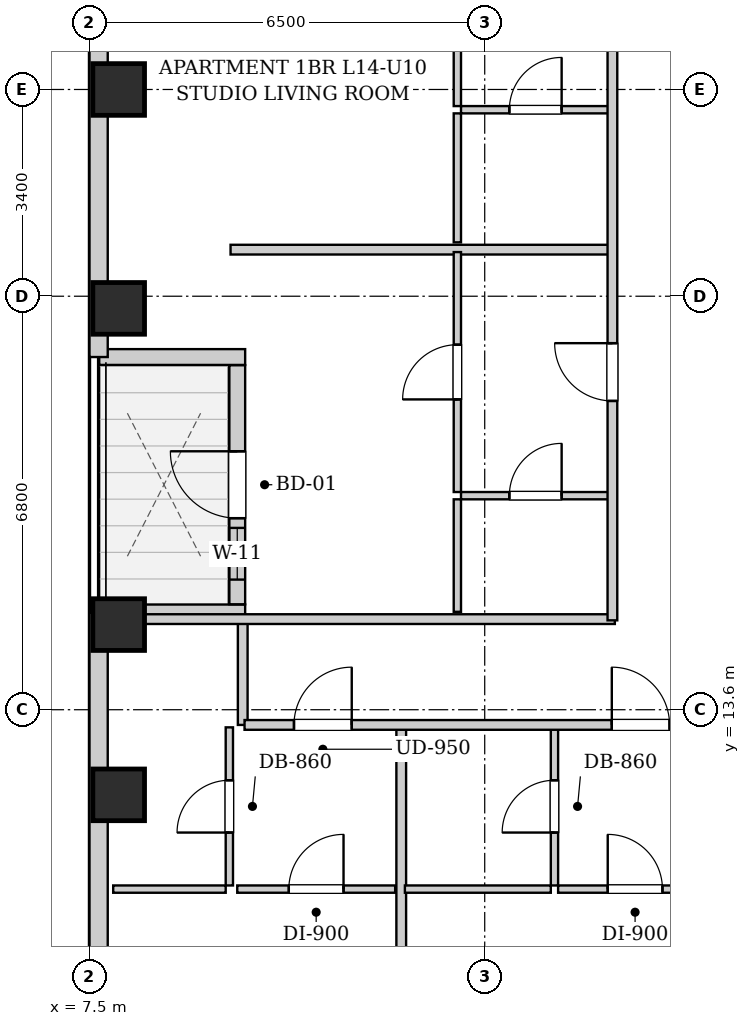
"""IFC4 building model, lengths in metres.
Left out: names, types, materials, properties, quantities, classifications, styles, units other than length and angle.
Written with IfcOpenShell. Run it as: python <this file> out.ifc"""

import sys

from ifc_helpers import new_model, si_unit, direction, frame, frame_2d, origin, origin_2d, place, context, subcontext, project, spatial, rectangle, extrude, element, fill, save


model = new_model("IFC4")
c1 = context("Model", 3, precision=1e-05, world=origin(), true_north=direction((0.0, 1.0)))
c2 = subcontext(c1, "Body", "Model", "MODEL_VIEW")
j1 = project(units=[si_unit("LENGTHUNIT", "METRE"), si_unit("PLANEANGLEUNIT", "RADIAN")], contexts=[c1])
p1 = place(None, origin())
s1 = spatial("IfcSite", under=j1, at=p1, CompositionType="ELEMENT")
p2 = place(p1, origin())
s2 = spatial("IfcBuilding", under=s1, at=p2, CompositionType="ELEMENT")
p3 = place(p2, frame((0.0, 0.0, 54.6)))
s3 = spatial("IfcBuildingStorey", under=s2, at=p3, CompositionType="ELEMENT", Elevation=54.6)
for number, where, z_axis, x_axis in (
    (1, (7.98, 12.2, 0.0), (0.0, 0.0, 1.0), (1.0, 0.0, 0.0)),
    (2, (7.98, 15.0, 0.0), (0.0, 0.0, 1.0), (1.0, 0.0, 0.0)),
    (3, (7.98, 20.2, 0.0), (0.0, 0.0, 1.0), (1.0, 0.0, 0.0)),
    (4, (7.98, 23.8, 0.0), (0.0, 0.0, 1.0), (1.0, 0.0, 0.0)),
):
    element("IfcColumn", number, at=place(p3, frame(where, z_axis=z_axis, x_axis=x_axis)), inside=s3, PredefinedType="COLUMN", context=c2, shape_type="SweptSolid", body=[
        extrude(rectangle(XDim=0.85, YDim=0.85, at=origin_2d()), origin(), (0.0, 0.0, 1.0), 3.2),
    ])
p4 = place(p3, frame((7.65, 2.5, 0.0), z_axis=(0.0, 0.0, 1.0), x_axis=(0.0, 1.0, 0.0)))
e5 = element("IfcWall", 5, at=p4, inside=s3, PredefinedType="SOLIDWALL", context=c2, shape_type="SweptSolid", body=[
    extrude(rectangle(XDim=12.7, YDim=0.3, at=frame_2d((6.35, 0.0))), origin(), (0.0, 0.0, 1.0), 1.975),
])
p5 = place(p4, frame((3.257, 0.0, 0.55)))
e6 = element("IfcOpeningElement", 6, at=p5, cuts=e5, PredefinedType="OPENING", context=c2, shape_type="SweptSolid", body=[
    extrude(rectangle(XDim=1.8, YDim=1.2, at=frame_2d((0.9, 0.6))), frame((0.0, 0.16, 0.0), z_axis=(0.0, -1.0, 0.0), x_axis=(1.0, 0.0, 0.0)), (0.0, 0.0, 1.0), 0.32),
])
p6 = place(p4, frame((1.185, 0.0, 0.55)))
e7 = element("IfcOpeningElement", 7, at=p6, cuts=e5, PredefinedType="OPENING", context=c2, shape_type="SweptSolid", body=[
    extrude(rectangle(XDim=1.35, YDim=1.2, at=frame_2d((0.675, 0.6))), frame((0.0, 0.16, 0.0), z_axis=(0.0, -1.0, 0.0), x_axis=(1.0, 0.0, 0.0)), (0.0, 0.0, 1.0), 0.32),
])
p7 = place(p3, frame((7.66, 15.2, 0.0), z_axis=(0.0, 0.0, 1.0), x_axis=(1.0, 0.0, 0.0)))
e8 = element("IfcWall", 8, at=p7, inside=s3, PredefinedType="SOLIDWALL", context=c2, shape_type="SweptSolid", body=[
    extrude(rectangle(XDim=2.4, YDim=0.26, at=frame_2d((1.2, 0.0))), origin(), (0.0, 0.0, 1.0), 2.94),
])
p8 = place(p3, frame((9.93, 15.334, 0.0), z_axis=(0.0, 0.0, 1.0), x_axis=(0.0, 1.0, 0.0)))
e9 = element("IfcWall", 9, at=p8, inside=s3, PredefinedType="SOLIDWALL", context=c2, shape_type="SweptSolid", body=[
    extrude(rectangle(XDim=3.932, YDim=0.26, at=frame_2d((1.966, 0.0))), origin(), (0.0, 0.0, 1.0), 2.94),
])
p9 = place(p8, frame((1.416, 0.0, 0.0)))
e10 = element("IfcOpeningElement", 10, at=p9, cuts=e9, PredefinedType="OPENING", context=c2, shape_type="SweptSolid", body=[
    extrude(rectangle(XDim=1.1, YDim=2.0, at=frame_2d((0.55, 1.0))), frame((0.0, 0.14, 0.0), z_axis=(0.0, -1.0, 0.0), x_axis=(1.0, 0.0, 0.0)), (0.0, 0.0, 1.0), 0.28),
])
p10 = place(p8, frame((0.406, 0.0, 0.55)))
e11 = element("IfcOpeningElement", 11, at=p10, cuts=e9, PredefinedType="OPENING", context=c2, shape_type="SweptSolid", body=[
    extrude(rectangle(XDim=0.85, YDim=1.2, at=frame_2d((0.425, 0.6))), frame((0.0, 0.14, 0.0), z_axis=(0.0, -1.0, 0.0), x_axis=(1.0, 0.0, 0.0)), (0.0, 0.0, 1.0), 0.28),
])
p11 = place(p3, frame((10.06, 19.4, 0.0), z_axis=(0.0, 0.0, 1.0), x_axis=(-1.0, 0.0, 0.0)))
e12 = element("IfcWall", 12, at=p11, inside=s3, PredefinedType="SOLIDWALL", context=c2, shape_type="SweptSolid", body=[
    extrude(rectangle(XDim=2.4, YDim=0.26, at=frame_2d((1.2, 0.0))), origin(), (0.0, 0.0, 1.0), 2.94),
])
p12 = place(p3, frame((7.65, 19.4, 0.0), z_axis=(0.0, 0.0, 1.0), x_axis=(0.0, 1.0, 0.0)))
e13 = element("IfcWall", 13, at=p12, inside=s3, PredefinedType="SOLIDWALL", context=c2, shape_type="SweptSolid", body=[
    extrude(rectangle(XDim=25.7, YDim=0.3, at=frame_2d((12.85, 0.0))), origin(), (0.0, 0.0, 1.0), 1.975),
])
p13 = place(p12, frame((20.185, 0.0, 0.55)))
e14 = element("IfcOpeningElement", 14, at=p13, cuts=e13, PredefinedType="OPENING", context=c2, shape_type="SweptSolid", body=[
    extrude(rectangle(XDim=1.8, YDim=1.2, at=frame_2d((0.9, 0.6))), frame((0.0, 0.16, 0.0), z_axis=(0.0, -1.0, 0.0), x_axis=(1.0, 0.0, 0.0)), (0.0, 0.0, 1.0), 0.32),
])
p14 = place(p12, frame((14.585, 0.0, 0.55)))
e15 = element("IfcOpeningElement", 15, at=p14, cuts=e13, PredefinedType="OPENING", context=c2, shape_type="SweptSolid", body=[
    extrude(rectangle(XDim=1.35, YDim=1.2, at=frame_2d((0.675, 0.6))), frame((0.0, 0.16, 0.0), z_axis=(0.0, -1.0, 0.0), x_axis=(1.0, 0.0, 0.0)), (0.0, 0.0, 1.0), 0.32),
])
p15 = place(p12, frame((5.1, 0.0, 0.55)))
e16 = element("IfcOpeningElement", 16, at=p15, cuts=e13, PredefinedType="OPENING", context=c2, shape_type="SweptSolid", body=[
    extrude(rectangle(XDim=1.8, YDim=1.2, at=frame_2d((0.9, 0.6))), frame((0.0, 0.16, 0.0), z_axis=(0.0, -1.0, 0.0), x_axis=(1.0, 0.0, 0.0)), (0.0, 0.0, 1.0), 0.32),
])
p16 = place(p12, frame((7.16, 0.0, 0.55)))
e17 = element("IfcOpeningElement", 17, at=p16, cuts=e13, PredefinedType="OPENING", context=c2, shape_type="SweptSolid", body=[
    extrude(rectangle(XDim=1.35, YDim=1.2, at=frame_2d((0.675, 0.6))), frame((0.0, 0.16, 0.0), z_axis=(0.0, -1.0, 0.0), x_axis=(1.0, 0.0, 0.0)), (0.0, 0.0, 1.0), 0.32),
])
p17 = place(p3, frame((10.02, 13.35, 0.0), z_axis=(0.0, 0.0, 1.0), x_axis=(0.0, 1.0, 0.0)))
e18 = element("IfcWall", 18, at=p17, inside=s3, PredefinedType="PARTITIONING", context=c2, shape_type="SweptSolid", body=[
    extrude(rectangle(XDim=1.74, YDim=0.16, at=frame_2d((0.87, 0.0))), origin(), (0.0, 0.0, 1.0), 2.94),
])
p18 = place(p3, frame((7.78, 15.09, 0.0), z_axis=(0.0, 0.0, 1.0), x_axis=(1.0, 0.0, 0.0)))
e19 = element("IfcWall", 19, at=p18, inside=s3, PredefinedType="PARTITIONING", context=c2, shape_type="SweptSolid", body=[
    extrude(rectangle(XDim=8.36, YDim=0.16, at=frame_2d((4.18, 0.0))), origin(), (0.0, 0.0, 1.0), 2.232),
])
p19 = place(p3, frame((9.8, 10.71, 0.0), z_axis=(0.0, 0.0, 1.0), x_axis=(0.0, 1.0, 0.0)))
e20 = element("IfcWall", 20, at=p19, inside=s3, PredefinedType="PARTITIONING", context=c2, shape_type="SweptSolid", body=[
    extrude(rectangle(XDim=2.6, YDim=0.12, at=frame_2d((1.3, 0.0))), origin(), (0.0, 0.0, 1.0), 2.94),
])
p20 = place(p19, frame((0.87, 0.0, 0.0)))
e21 = element("IfcOpeningElement", 21, at=p20, cuts=e20, PredefinedType="OPENING", context=c2, shape_type="SweptSolid", body=[
    extrude(rectangle(XDim=0.86, YDim=2.05, at=frame_2d((0.43, 1.025))), frame((0.0, 0.07, 0.0), z_axis=(0.0, -1.0, 0.0), x_axis=(1.0, 0.0, 0.0)), (0.0, 0.0, 1.0), 0.14),
])
p21 = place(p3, frame((7.89, 10.65, 0.0), z_axis=(0.0, 0.0, 1.0), x_axis=(1.0, 0.0, 0.0)))
e22 = element("IfcWall", 22, at=p21, inside=s3, PredefinedType="PARTITIONING", context=c2, shape_type="SweptSolid", body=[
    extrude(rectangle(XDim=1.85, YDim=0.12, at=frame_2d((0.925, 0.0))), origin(), (0.0, 0.0, 1.0), 2.94),
])
p22 = place(p3, frame((9.93, 10.65, 0.0), z_axis=(0.0, 0.0, 1.0), x_axis=(1.0, 0.0, 0.0)))
e23 = element("IfcWall", 23, at=p22, inside=s3, PredefinedType="PARTITIONING", context=c2, shape_type="SweptSolid", body=[
    extrude(rectangle(XDim=2.597, YDim=0.12, at=frame_2d((1.299, 0.0))), origin(), (0.0, 0.0, 1.0), 2.94),
])
p23 = place(p22, frame((0.848, 0.0, 0.0)))
e24 = element("IfcOpeningElement", 24, at=p23, cuts=e23, PredefinedType="OPENING", context=c2, shape_type="SweptSolid", body=[
    extrude(rectangle(XDim=0.9, YDim=2.05, at=frame_2d((0.45, 1.025))), frame((0.0, 0.07, 0.0), z_axis=(0.0, -1.0, 0.0), x_axis=(1.0, 0.0, 0.0)), (0.0, 0.0, 1.0), 0.14),
])
p24 = place(p3, frame((12.627, 2.26, 0.0), z_axis=(0.0, 0.0, 1.0), x_axis=(0.0, 1.0, 0.0)))
e25 = element("IfcWall", 25, at=p24, inside=s3, PredefinedType="PARTITIONING", context=c2, shape_type="SweptSolid", body=[
    extrude(rectangle(XDim=11.05, YDim=0.16, at=frame_2d((5.525, 0.0))), origin(), (0.0, 0.0, 1.0), 2.94),
])
p25 = place(p3, frame((15.147, 10.71, 0.0), z_axis=(0.0, 0.0, 1.0), x_axis=(0.0, 1.0, 0.0)))
e26 = element("IfcWall", 26, at=p25, inside=s3, PredefinedType="PARTITIONING", context=c2, shape_type="SweptSolid", body=[
    extrude(rectangle(XDim=2.6, YDim=0.12, at=frame_2d((1.3, 0.0))), origin(), (0.0, 0.0, 1.0), 2.94),
])
p26 = place(p25, frame((0.87, 0.0, 0.0)))
e27 = element("IfcOpeningElement", 27, at=p26, cuts=e26, PredefinedType="OPENING", context=c2, shape_type="SweptSolid", body=[
    extrude(rectangle(XDim=0.86, YDim=2.05, at=frame_2d((0.43, 1.025))), frame((0.0, 0.07, 0.0), z_axis=(0.0, -1.0, 0.0), x_axis=(1.0, 0.0, 0.0)), (0.0, 0.0, 1.0), 0.14),
])
p27 = place(p3, frame((12.687, 10.65, 0.0), z_axis=(0.0, 0.0, 1.0), x_axis=(1.0, 0.0, 0.0)))
e28 = element("IfcWall", 28, at=p27, inside=s3, PredefinedType="PARTITIONING", context=c2, shape_type="SweptSolid", body=[
    extrude(rectangle(XDim=2.4, YDim=0.12, at=frame_2d((1.2, 0.0))), origin(), (0.0, 0.0, 1.0), 2.94),
])
p28 = place(p3, frame((15.207, 10.65, 0.0), z_axis=(0.0, 0.0, 1.0), x_axis=(1.0, 0.0, 0.0)))
e29 = element("IfcWall", 29, at=p28, inside=s3, PredefinedType="PARTITIONING", context=c2, shape_type="SweptSolid", body=[
    extrude(rectangle(XDim=2.533, YDim=0.12, at=frame_2d((1.267, 0.0))), origin(), (0.0, 0.0, 1.0), 2.94),
])
p29 = place(p28, frame((0.816, 0.0, 0.0)))
e30 = element("IfcOpeningElement", 30, at=p29, cuts=e29, PredefinedType="OPENING", context=c2, shape_type="SweptSolid", body=[
    extrude(rectangle(XDim=0.9, YDim=2.05, at=frame_2d((0.45, 1.025))), frame((0.0, 0.07, 0.0), z_axis=(0.0, -1.0, 0.0), x_axis=(1.0, 0.0, 0.0)), (0.0, 0.0, 1.0), 0.14),
])
p30 = place(p3, frame((9.82, 21.166, 0.0), z_axis=(0.0, 0.0, 1.0), x_axis=(1.0, 0.0, 0.0)))
e31 = element("IfcWall", 31, at=p30, inside=s3, PredefinedType="PARTITIONING", context=c2, shape_type="SweptSolid", body=[
    extrude(rectangle(XDim=6.24, YDim=0.16, at=frame_2d((3.12, 0.0))), origin(), (0.0, 0.0, 1.0), 2.94),
])
p31 = place(p3, frame((13.61, 17.12, 0.0), z_axis=(0.0, 0.0, 1.0), x_axis=(1.0, 0.0, 0.0)))
e32 = element("IfcWall", 32, at=p31, inside=s3, PredefinedType="PARTITIONING", context=c2, shape_type="SweptSolid", body=[
    extrude(rectangle(XDim=2.45, YDim=0.12, at=frame_2d((1.225, 0.0))), origin(), (0.0, 0.0, 1.0), 2.94),
])
p32 = place(p31, frame((0.795, 0.0, 0.0)))
e33 = element("IfcOpeningElement", 33, at=p32, cuts=e32, PredefinedType="OPENING", context=c2, shape_type="SweptSolid", body=[
    extrude(rectangle(XDim=0.86, YDim=2.05, at=frame_2d((0.43, 1.025))), frame((0.0, 0.07, 0.0), z_axis=(0.0, -1.0, 0.0), x_axis=(1.0, 0.0, 0.0)), (0.0, 0.0, 1.0), 0.14),
])
p33 = place(p3, frame((13.55, 15.21, 0.0), z_axis=(0.0, 0.0, 1.0), x_axis=(0.0, 1.0, 0.0)))
e34 = element("IfcWall", 34, at=p33, inside=s3, PredefinedType="PARTITIONING", context=c2, shape_type="SweptSolid", body=[
    extrude(rectangle(XDim=1.85, YDim=0.12, at=frame_2d((0.925, 0.0))), origin(), (0.0, 0.0, 1.0), 2.94),
])
p34 = place(p3, frame((13.55, 17.18, 0.0), z_axis=(0.0, 0.0, 1.0), x_axis=(0.0, 1.0, 0.0)))
e35 = element("IfcWall", 35, at=p34, inside=s3, PredefinedType="PARTITIONING", context=c2, shape_type="SweptSolid", body=[
    extrude(rectangle(XDim=3.946, YDim=0.12, at=frame_2d((1.973, 0.0))), origin(), (0.0, 0.0, 1.0), 2.94),
])
p35 = place(p34, frame((1.523, 0.0, 0.0)))
e36 = element("IfcOpeningElement", 36, at=p35, cuts=e35, PredefinedType="OPENING", context=c2, shape_type="SweptSolid", body=[
    extrude(rectangle(XDim=0.9, YDim=2.05, at=frame_2d((0.45, 1.025))), frame((0.0, 0.07, 0.0), z_axis=(0.0, -1.0, 0.0), x_axis=(1.0, 0.0, 0.0)), (0.0, 0.0, 1.0), 0.14),
])
p36 = place(p3, frame((13.61, 23.467, 0.0), z_axis=(0.0, 0.0, 1.0), x_axis=(1.0, 0.0, 0.0)))
e37 = element("IfcWall", 37, at=p36, inside=s3, PredefinedType="PARTITIONING", context=c2, shape_type="SweptSolid", body=[
    extrude(rectangle(XDim=2.45, YDim=0.12, at=frame_2d((1.225, 0.0))), origin(), (0.0, 0.0, 1.0), 2.94),
])
p37 = place(p36, frame((0.795, 0.0, 0.0)))
e38 = element("IfcOpeningElement", 38, at=p37, cuts=e37, PredefinedType="OPENING", context=c2, shape_type="SweptSolid", body=[
    extrude(rectangle(XDim=0.86, YDim=2.05, at=frame_2d((0.43, 1.025))), frame((0.0, 0.07, 0.0), z_axis=(0.0, -1.0, 0.0), x_axis=(1.0, 0.0, 0.0)), (0.0, 0.0, 1.0), 0.14),
])
p38 = place(p3, frame((13.55, 21.286, 0.0), z_axis=(0.0, 0.0, 1.0), x_axis=(0.0, 1.0, 0.0)))
e39 = element("IfcWall", 39, at=p38, inside=s3, PredefinedType="PARTITIONING", context=c2, shape_type="SweptSolid", body=[
    extrude(rectangle(XDim=2.121, YDim=0.12, at=frame_2d((1.061, 0.0))), origin(), (0.0, 0.0, 1.0), 2.94),
])
p39 = place(p3, frame((13.55, 23.527, 0.0), z_axis=(0.0, 0.0, 1.0), x_axis=(0.0, 1.0, 0.0)))
e40 = element("IfcWall", 40, at=p39, inside=s3, PredefinedType="PARTITIONING", context=c2, shape_type="SweptSolid", body=[
    extrude(rectangle(XDim=5.333, YDim=0.12, at=frame_2d((2.667, 0.0))), origin(), (0.0, 0.0, 1.0), 2.94),
])
p40 = place(p39, frame((2.216, 0.0, 0.0)))
e41 = element("IfcOpeningElement", 41, at=p40, cuts=e40, PredefinedType="OPENING", context=c2, shape_type="SweptSolid", body=[
    extrude(rectangle(XDim=0.9, YDim=2.05, at=frame_2d((0.45, 1.025))), frame((0.0, 0.07, 0.0), z_axis=(0.0, -1.0, 0.0), x_axis=(1.0, 0.0, 0.0)), (0.0, 0.0, 1.0), 0.14),
])
p41 = place(p3, frame((10.05, 13.35, 0.0), z_axis=(0.0, 0.0, 1.0), x_axis=(1.0, 0.0, 0.0)))
e42 = element("IfcWall", 42, at=p41, inside=s3, PredefinedType="PARTITIONING", context=c2, shape_type="SweptSolid", body=[
    extrude(rectangle(XDim=33.9, YDim=0.16, at=frame_2d((16.95, 0.0))), origin(), (0.0, 0.0, 1.0), 2.94),
])
p42 = place(p41, frame((0.813, 0.0, 0.0)))
e43 = element("IfcOpeningElement", 43, at=p42, cuts=e42, PredefinedType="OPENING", context=c2, shape_type="SweptSolid", body=[
    extrude(rectangle(XDim=0.95, YDim=2.1, at=frame_2d((0.475, 1.05))), frame((0.0, 0.09, 0.0), z_axis=(0.0, -1.0, 0.0), x_axis=(1.0, 0.0, 0.0)), (0.0, 0.0, 1.0), 0.18),
])
p43 = place(p41, frame((6.04, 0.0, 0.0)))
e44 = element("IfcOpeningElement", 44, at=p43, cuts=e42, PredefinedType="OPENING", context=c2, shape_type="SweptSolid", body=[
    extrude(rectangle(XDim=0.95, YDim=2.1, at=frame_2d((0.475, 1.05))), frame((0.0, 0.09, 0.0), z_axis=(0.0, -1.0, 0.0), x_axis=(1.0, 0.0, 0.0)), (0.0, 0.0, 1.0), 0.18),
])
p44 = place(p41, frame((18.09, 0.0, 0.0)))
e45 = element("IfcOpeningElement", 45, at=p44, cuts=e42, PredefinedType="OPENING", context=c2, shape_type="SweptSolid", body=[
    extrude(rectangle(XDim=0.95, YDim=2.1, at=frame_2d((0.475, 1.05))), frame((0.0, 0.09, 0.0), z_axis=(0.0, -1.0, 0.0), x_axis=(1.0, 0.0, 0.0)), (0.0, 0.0, 1.0), 0.18),
])
p45 = place(p41, frame((25.962, 0.0, 0.0)))
e46 = element("IfcOpeningElement", 46, at=p45, cuts=e42, PredefinedType="OPENING", context=c2, shape_type="SweptSolid", body=[
    extrude(rectangle(XDim=0.95, YDim=2.1, at=frame_2d((0.475, 1.05))), frame((0.0, 0.09, 0.0), z_axis=(0.0, -1.0, 0.0), x_axis=(1.0, 0.0, 0.0)), (0.0, 0.0, 1.0), 0.18),
])
p46 = place(p3, frame((16.1, 15.07, 0.0), z_axis=(0.0, 0.0, 1.0), x_axis=(0.0, 1.0, 0.0)))
e47 = element("IfcWall", 47, at=p46, inside=s3, PredefinedType="PARTITIONING", context=c2, shape_type="SweptSolid", body=[
    extrude(rectangle(XDim=13.93, YDim=0.16, at=frame_2d((6.965, 0.0))), origin(), (0.0, 0.0, 1.0), 2.94),
])
p47 = place(p46, frame((3.608, 0.0, 0.0)))
e48 = element("IfcOpeningElement", 48, at=p47, cuts=e47, PredefinedType="OPENING", context=c2, shape_type="SweptSolid", body=[
    extrude(rectangle(XDim=0.95, YDim=2.1, at=frame_2d((0.475, 1.05))), frame((0.0, 0.09, 0.0), z_axis=(0.0, -1.0, 0.0), x_axis=(1.0, 0.0, 0.0)), (0.0, 0.0, 1.0), 0.18),
])
p48 = place(p46, frame((10.649, 0.0, 0.0)))
e49 = element("IfcOpeningElement", 49, at=p48, cuts=e47, PredefinedType="OPENING", context=c2, shape_type="SweptSolid", body=[
    extrude(rectangle(XDim=0.95, YDim=2.1, at=frame_2d((0.475, 1.05))), frame((0.0, 0.09, 0.0), z_axis=(0.0, -1.0, 0.0), x_axis=(1.0, 0.0, 0.0)), (0.0, 0.0, 1.0), 0.18),
])
p49 = place(p20, origin())
e50 = element("IfcDoor", 50, at=p49, inside=s3, OperationType="SINGLE_SWING_LEFT", PredefinedType="DOOR", context=c2, shape_type="SweptSolid", body=[
    extrude(rectangle(XDim=0.86, YDim=2.05, at=frame_2d((0.43, 1.025))), frame((0.0, 0.025, 0.0), z_axis=(0.0, -1.0, 0.0), x_axis=(1.0, 0.0, 0.0)), (0.0, 0.0, 1.0), 0.05),
])
fill(e21, e50)
p50 = place(p23, origin())
e51 = element("IfcDoor", 51, at=p50, inside=s3, OperationType="SINGLE_SWING_RIGHT", PredefinedType="DOOR", context=c2, shape_type="SweptSolid", body=[
    extrude(rectangle(XDim=0.9, YDim=2.05, at=frame_2d((0.45, 1.025))), frame((0.0, 0.025, 0.0), z_axis=(0.0, -1.0, 0.0), x_axis=(1.0, 0.0, 0.0)), (0.0, 0.0, 1.0), 0.05),
])
fill(e24, e51)
p51 = place(p26, origin())
e52 = element("IfcDoor", 52, at=p51, inside=s3, OperationType="SINGLE_SWING_LEFT", PredefinedType="DOOR", context=c2, shape_type="SweptSolid", body=[
    extrude(rectangle(XDim=0.86, YDim=2.05, at=frame_2d((0.43, 1.025))), frame((0.0, 0.025, 0.0), z_axis=(0.0, -1.0, 0.0), x_axis=(1.0, 0.0, 0.0)), (0.0, 0.0, 1.0), 0.05),
])
fill(e27, e52)
p52 = place(p29, origin())
e53 = element("IfcDoor", 53, at=p52, inside=s3, OperationType="SINGLE_SWING_LEFT", PredefinedType="DOOR", context=c2, shape_type="SweptSolid", body=[
    extrude(rectangle(XDim=0.9, YDim=2.05, at=frame_2d((0.45, 1.025))), frame((0.0, 0.025, 0.0), z_axis=(0.0, -1.0, 0.0), x_axis=(1.0, 0.0, 0.0)), (0.0, 0.0, 1.0), 0.05),
])
fill(e30, e53)
p53 = place(p32, origin())
e54 = element("IfcDoor", 54, at=p53, inside=s3, OperationType="SINGLE_SWING_RIGHT", PredefinedType="DOOR", context=c2, shape_type="SweptSolid", body=[
    extrude(rectangle(XDim=0.86, YDim=2.05, at=frame_2d((0.43, 1.025))), frame((0.0, 0.025, 0.0), z_axis=(0.0, -1.0, 0.0), x_axis=(1.0, 0.0, 0.0)), (0.0, 0.0, 1.0), 0.05),
])
fill(e33, e54)
p54 = place(p35, origin())
e55 = element("IfcDoor", 55, at=p54, inside=s3, OperationType="SINGLE_SWING_LEFT", PredefinedType="DOOR", context=c2, shape_type="SweptSolid", body=[
    extrude(rectangle(XDim=0.9, YDim=2.05, at=frame_2d((0.45, 1.025))), frame((0.0, 0.025, 0.0), z_axis=(0.0, -1.0, 0.0), x_axis=(1.0, 0.0, 0.0)), (0.0, 0.0, 1.0), 0.05),
])
fill(e36, e55)
p55 = place(p37, origin())
e56 = element("IfcDoor", 56, at=p55, inside=s3, OperationType="SINGLE_SWING_RIGHT", PredefinedType="DOOR", context=c2, shape_type="SweptSolid", body=[
    extrude(rectangle(XDim=0.86, YDim=2.05, at=frame_2d((0.43, 1.025))), frame((0.0, 0.025, 0.0), z_axis=(0.0, -1.0, 0.0), x_axis=(1.0, 0.0, 0.0)), (0.0, 0.0, 1.0), 0.05),
])
fill(e38, e56)
p56 = place(p42, origin())
e57 = element("IfcDoor", 57, at=p56, inside=s3, OperationType="SINGLE_SWING_RIGHT", PredefinedType="DOOR", context=c2, shape_type="SweptSolid", body=[
    extrude(rectangle(XDim=0.95, YDim=2.1, at=frame_2d((0.475, 1.05))), frame((0.0, 0.025, 0.0), z_axis=(0.0, -1.0, 0.0), x_axis=(1.0, 0.0, 0.0)), (0.0, 0.0, 1.0), 0.05),
])
fill(e43, e57)
p57 = place(p43, origin())
e58 = element("IfcDoor", 58, at=p57, inside=s3, OperationType="SINGLE_SWING_LEFT", PredefinedType="DOOR", context=c2, shape_type="SweptSolid", body=[
    extrude(rectangle(XDim=0.95, YDim=2.1, at=frame_2d((0.475, 1.05))), frame((0.0, 0.025, 0.0), z_axis=(0.0, -1.0, 0.0), x_axis=(1.0, 0.0, 0.0)), (0.0, 0.0, 1.0), 0.05),
])
fill(e44, e58)
p58 = place(p47, origin())
e59 = element("IfcDoor", 59, at=p58, inside=s3, OperationType="SINGLE_SWING_RIGHT", PredefinedType="DOOR", context=c2, shape_type="SweptSolid", body=[
    extrude(rectangle(XDim=0.95, YDim=2.1, at=frame_2d((0.475, 1.05))), frame((0.0, 0.025, 0.0), z_axis=(0.0, -1.0, 0.0), x_axis=(1.0, 0.0, 0.0)), (0.0, 0.0, 1.0), 0.05),
])
fill(e48, e59)
p59 = place(p9, origin())
e60 = element("IfcDoor", 60, at=p59, inside=s3, OperationType="SINGLE_SWING_RIGHT", PredefinedType="DOOR", context=c2, shape_type="SweptSolid", body=[
    extrude(rectangle(XDim=1.1, YDim=2.0, at=frame_2d((0.55, 1.0))), frame((0.0, 0.025, 0.0), z_axis=(0.0, -1.0, 0.0), x_axis=(1.0, 0.0, 0.0)), (0.0, 0.0, 1.0), 0.05),
])
fill(e10, e60)
p60 = place(p10, origin())
e61 = element("IfcWindow", 61, at=p60, inside=s3, PartitioningType="SINGLE_PANEL", PredefinedType="WINDOW", context=c2, shape_type="SweptSolid", body=[
    extrude(rectangle(XDim=0.85, YDim=1.2, at=frame_2d((0.425, 0.6))), frame((0.0, 0.03, 0.0), z_axis=(0.0, -1.0, 0.0), x_axis=(1.0, 0.0, 0.0)), (0.0, 0.0, 1.0), 0.06),
])
fill(e11, e61)
save(model, sys.argv[1])
